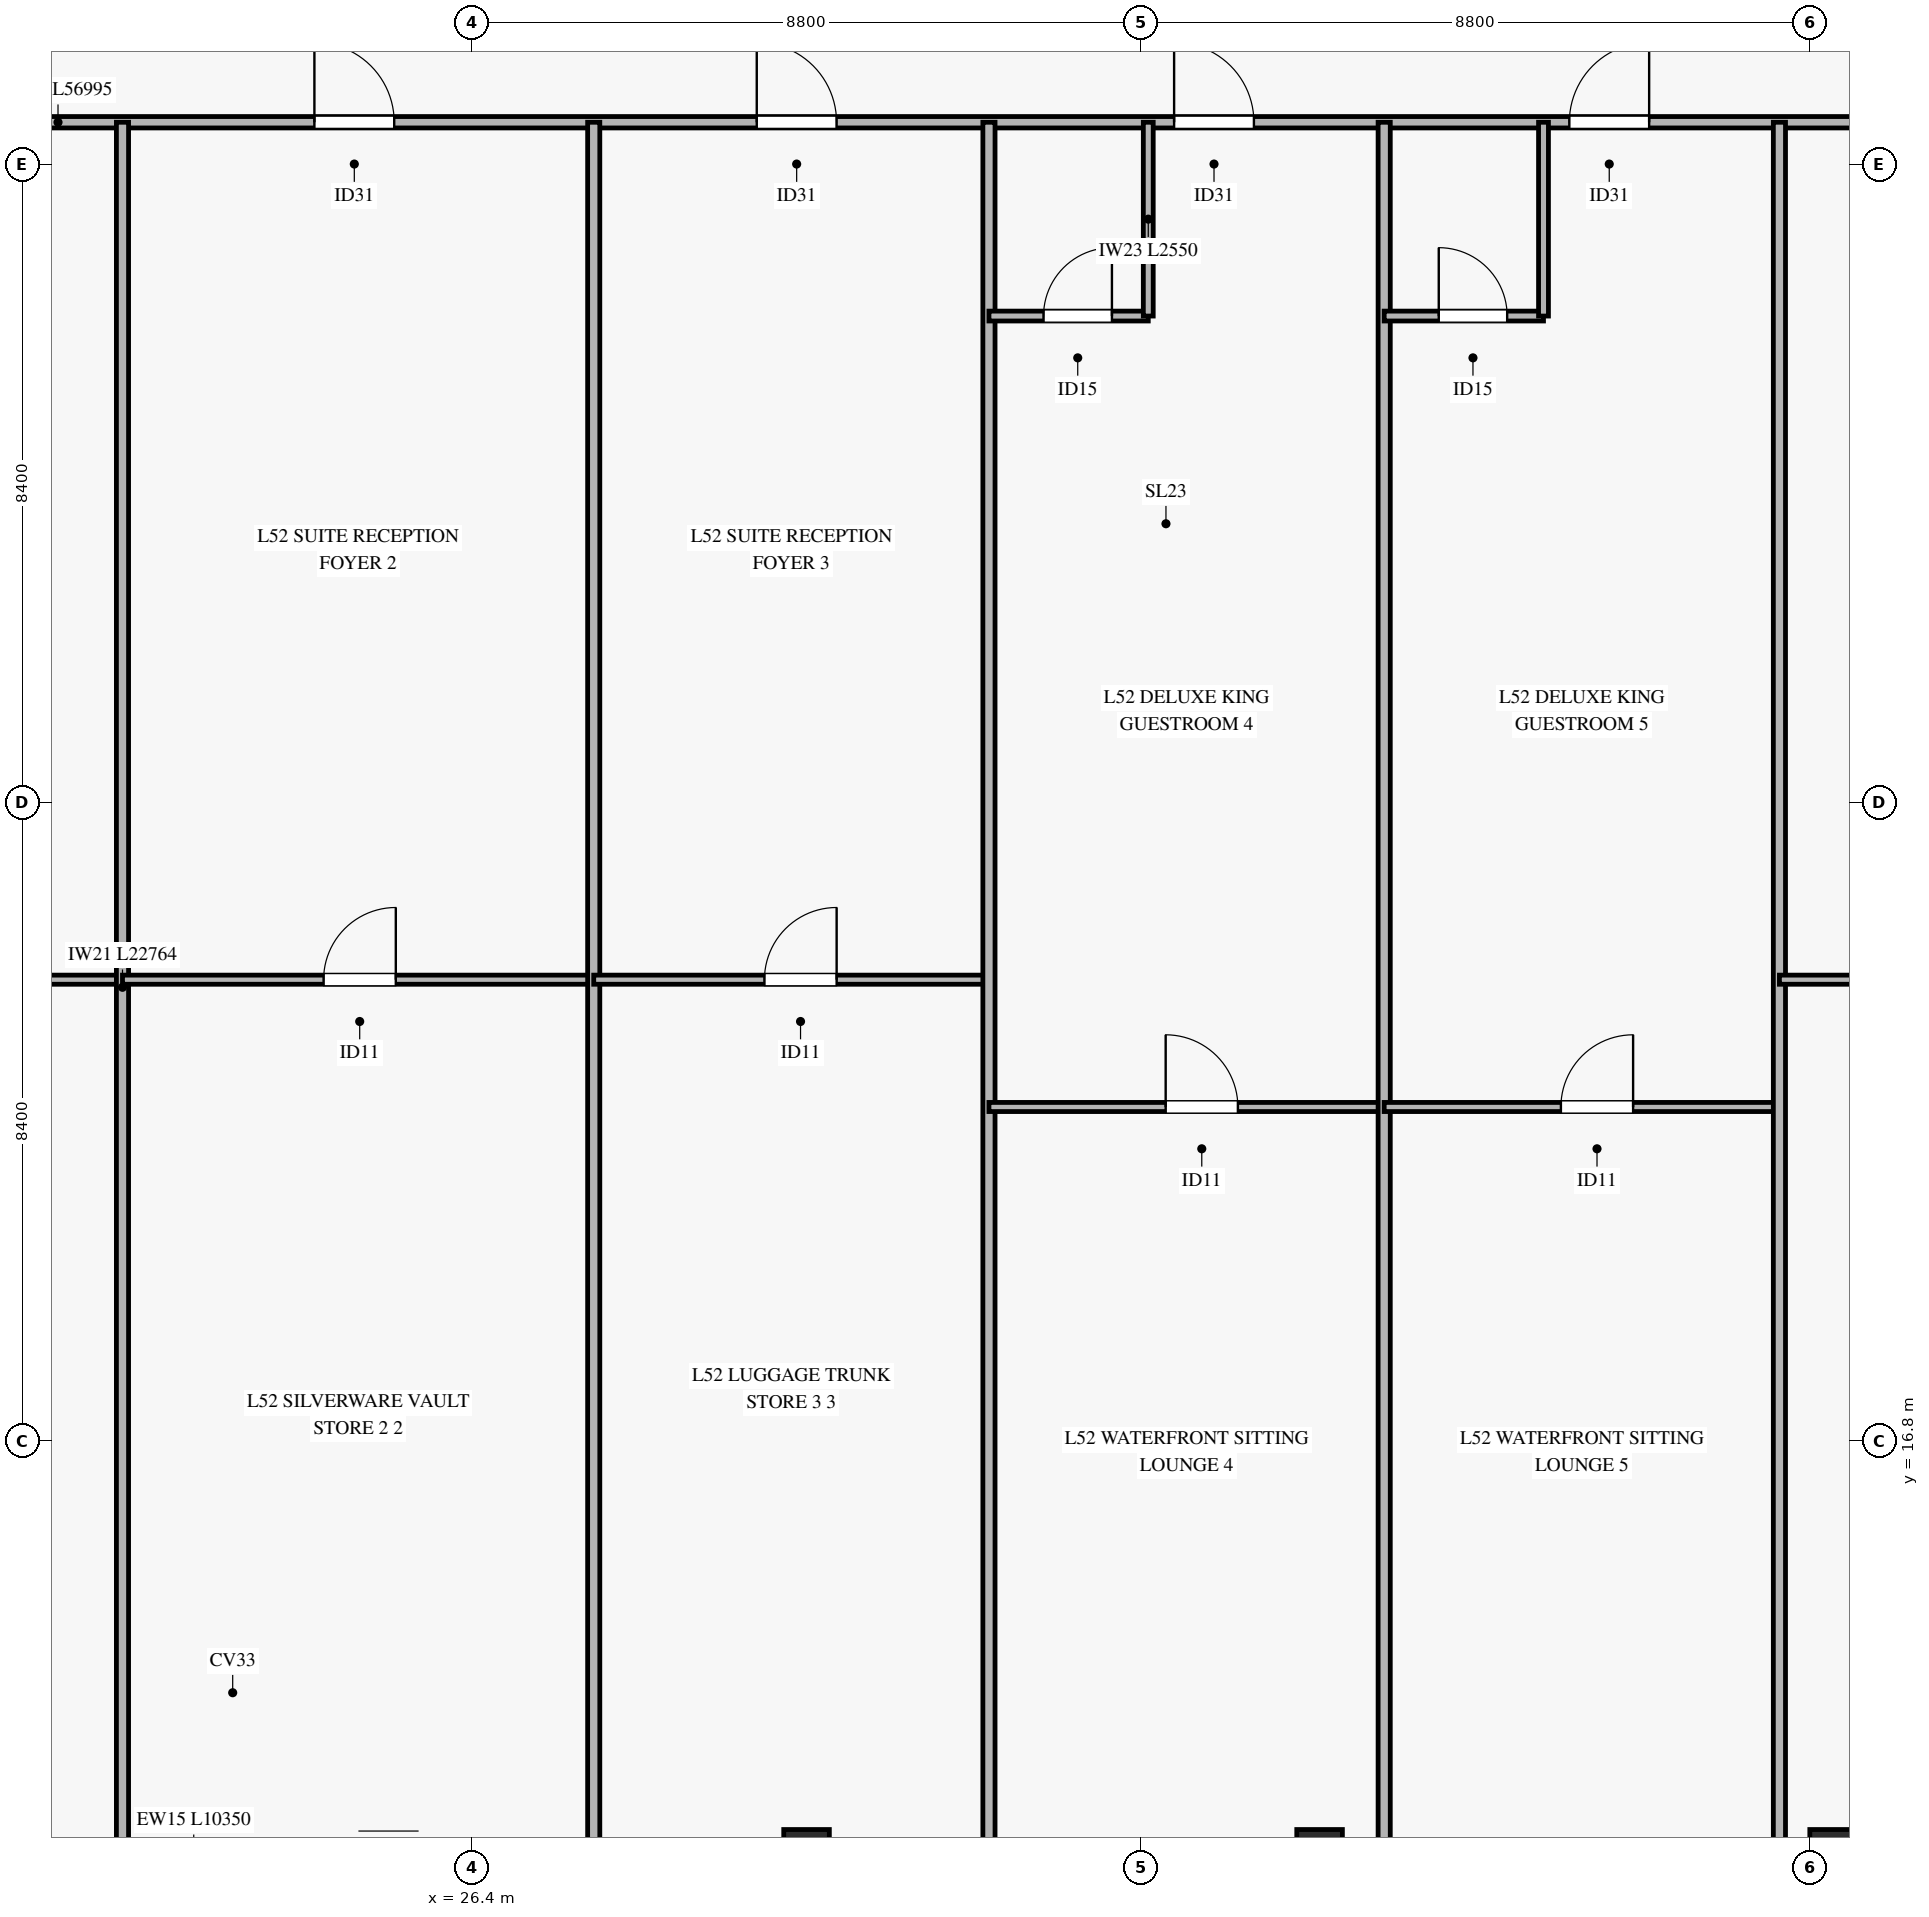
"""IFC4 building model, lengths in metres.
Left out: names, types, materials, properties, quantities, classifications, styles, units other than length and angle.
Written with IfcOpenShell. Run it as: python <this file> out.ifc"""

import sys

from ifc_helpers import new_model, si_unit, direction, frame, frame_2d, origin, origin_2d, place, context, subcontext, project, spatial, rectangle, hollow_rectangle, extrude, source, transform, mapped, element, fill, save


model = new_model("IFC4")
c1 = context("Model", 3, precision=1e-05, world=origin(), true_north=direction((0.0, 1.0)))
c2 = subcontext(c1, "Body", "Model", "MODEL_VIEW")
j1 = project(units=[si_unit("LENGTHUNIT", "METRE"), si_unit("PLANEANGLEUNIT", "RADIAN")], contexts=[c1])
p1 = place(None, origin())
s1 = spatial("IfcSite", under=j1, at=p1, CompositionType="ELEMENT")
p2 = place(p1, origin())
s2 = spatial("IfcBuilding", under=s1, at=p2, CompositionType="ELEMENT")
p3 = place(p2, frame((0.0, 0.0, 206.2)))
s3 = spatial("IfcBuildingStorey", under=s2, at=p3, CompositionType="ELEMENT", Elevation=206.2)
m1 = source(origin(), c2, "Body", "SweptSolid", [
    extrude(hollow_rectangle(XDim=0.6, YDim=0.6, WallThickness=0.028, at=origin_2d()), origin(), (0.0, 0.0, 1.0), 3.27),
])
for number, where, z_axis, x_axis in (
    (1, (30.8, 11.386, 0.0), (0.0, 0.0, 1.0), (1.0, 0.0, 0.0)),
    (2, (37.55, 11.386, 0.0), (0.0, 0.0, 1.0), (1.0, 0.0, 0.0)),
    (3, (44.3, 11.386, 0.0), (0.0, 0.0, 1.0), (1.0, 0.0, 0.0)),
):
    element("IfcColumn", number, at=place(p3, frame(where, z_axis=z_axis, x_axis=x_axis)), inside=s3, PredefinedType="COLUMN", context=c2, shape_type="MappedRepresentation", body=[
        mapped(m1, transform((0.0, 0.0, 0.0), x_axis=(1.0, 0.0, 0.0), y_axis=(0.0, 1.0, 0.0), z_axis=(0.0, 0.0, 1.0), scale=1.0)),
    ])
p4 = place(p3, frame((6.703, 34.15, 0.0), z_axis=(0.0, 0.0, 1.0), x_axis=(1.0, 0.0, 0.0)))
e4 = element("IfcWall", 4, at=p4, inside=s3, PredefinedType="PARTITIONING", context=c2, shape_type="SweptSolid", body=[
    extrude(rectangle(XDim=56.995, YDim=0.15, at=frame_2d((28.498, 0.0))), origin(), (0.0, 0.0, 1.0), 2.455),
])
p5 = place(p4, frame((6.03, 0.0, 0.0)))
e5 = element("IfcOpeningElement", 5, at=p5, cuts=e4, PredefinedType="OPENING", context=c2, shape_type="SweptSolid", body=[
    extrude(rectangle(XDim=1.05, YDim=2.15, at=frame_2d((0.525, 1.075))), frame((0.0, 0.085, 0.0), z_axis=(0.0, -1.0, 0.0), x_axis=(1.0, 0.0, 0.0)), (0.0, 0.0, 1.0), 0.17),
])
p6 = place(p4, frame((17.622, 0.0, 0.0)))
e6 = element("IfcOpeningElement", 6, at=p6, cuts=e4, PredefinedType="OPENING", context=c2, shape_type="SweptSolid", body=[
    extrude(rectangle(XDim=1.05, YDim=2.15, at=frame_2d((0.525, 1.075))), frame((0.0, 0.085, 0.0), z_axis=(0.0, -1.0, 0.0), x_axis=(1.0, 0.0, 0.0)), (0.0, 0.0, 1.0), 0.17),
])
p7 = place(p4, frame((23.442, 0.0, 0.0)))
e7 = element("IfcOpeningElement", 7, at=p7, cuts=e4, PredefinedType="OPENING", context=c2, shape_type="SweptSolid", body=[
    extrude(rectangle(XDim=1.05, YDim=2.15, at=frame_2d((0.525, 1.075))), frame((0.0, 0.085, 0.0), z_axis=(0.0, -1.0, 0.0), x_axis=(1.0, 0.0, 0.0)), (0.0, 0.0, 1.0), 0.17),
])
p8 = place(p4, frame((28.933, 0.0, 0.0)))
e8 = element("IfcOpeningElement", 8, at=p8, cuts=e4, PredefinedType="OPENING", context=c2, shape_type="SweptSolid", body=[
    extrude(rectangle(XDim=1.05, YDim=2.15, at=frame_2d((0.525, 1.075))), frame((0.0, 0.085, 0.0), z_axis=(0.0, -1.0, 0.0), x_axis=(1.0, 0.0, 0.0)), (0.0, 0.0, 1.0), 0.17),
])
p9 = place(p4, frame((34.133, 0.0, 0.0)))
e9 = element("IfcOpeningElement", 9, at=p9, cuts=e4, PredefinedType="OPENING", context=c2, shape_type="SweptSolid", body=[
    extrude(rectangle(XDim=1.05, YDim=2.15, at=frame_2d((0.525, 1.075))), frame((0.0, 0.085, 0.0), z_axis=(0.0, -1.0, 0.0), x_axis=(1.0, 0.0, 0.0)), (0.0, 0.0, 1.0), 0.17),
])
p10 = place(p4, frame((44.627, 0.0, 0.0)))
e10 = element("IfcOpeningElement", 10, at=p10, cuts=e4, PredefinedType="OPENING", context=c2, shape_type="SweptSolid", body=[
    extrude(rectangle(XDim=1.05, YDim=2.15, at=frame_2d((0.525, 1.075))), frame((0.0, 0.085, 0.0), z_axis=(0.0, -1.0, 0.0), x_axis=(1.0, 0.0, 0.0)), (0.0, 0.0, 1.0), 0.17),
])
p11 = place(p3, frame((6.703, 22.868, 0.0), z_axis=(0.0, 0.0, 1.0), x_axis=(1.0, 0.0, 0.0)))
e11 = element("IfcWall", 11, at=p11, inside=s3, PredefinedType="PARTITIONING", context=c2, shape_type="SweptSolid", body=[
    extrude(rectangle(XDim=15.097, YDim=0.12, at=frame_2d((7.549, 0.0))), origin(), (0.0, 0.0, 1.0), 2.455),
])
p12 = place(p11, frame((6.325, 0.0, 0.0)))
e12 = element("IfcOpeningElement", 12, at=p12, cuts=e11, PredefinedType="OPENING", context=c2, shape_type="SweptSolid", body=[
    extrude(rectangle(XDim=0.95, YDim=2.1, at=frame_2d((0.475, 1.05))), frame((0.0, 0.07, 0.0), z_axis=(0.0, -1.0, 0.0), x_axis=(1.0, 0.0, 0.0)), (0.0, 0.0, 1.0), 0.14),
])
p13 = place(p3, frame((21.8, 11.386, 0.0), z_axis=(0.0, 0.0, 1.0), x_axis=(0.0, 1.0, 0.0)))
e13 = element("IfcWall", 13, at=p13, inside=s3, PredefinedType="PARTITIONING", context=c2, shape_type="SweptSolid", body=[
    extrude(rectangle(XDim=22.764, YDim=0.16, at=frame_2d((11.382, 0.0))), origin(), (0.0, 0.0, 1.0), 2.755),
])
p14 = place(p3, frame((21.8, 22.868, 0.0), z_axis=(0.0, 0.0, 1.0), x_axis=(1.0, 0.0, 0.0)))
e14 = element("IfcWall", 14, at=p14, inside=s3, PredefinedType="PARTITIONING", context=c2, shape_type="SweptSolid", body=[
    extrude(rectangle(XDim=6.2, YDim=0.12, at=frame_2d((3.1, 0.0))), origin(), (0.0, 0.0, 1.0), 3.27),
])
p15 = place(p14, frame((2.646, 0.0, 0.0)))
e15 = element("IfcOpeningElement", 15, at=p15, cuts=e14, PredefinedType="OPENING", context=c2, shape_type="SweptSolid", body=[
    extrude(rectangle(XDim=0.95, YDim=2.1, at=frame_2d((0.475, 1.05))), frame((0.0, 0.07, 0.0), z_axis=(0.0, -1.0, 0.0), x_axis=(1.0, 0.0, 0.0)), (0.0, 0.0, 1.0), 0.14),
])
p16 = place(p3, frame((28.0, 11.386, 0.0), z_axis=(0.0, 0.0, 1.0), x_axis=(0.0, 1.0, 0.0)))
e16 = element("IfcWall", 16, at=p16, inside=s3, PredefinedType="PARTITIONING", context=c2, shape_type="SweptSolid", body=[
    extrude(rectangle(XDim=22.764, YDim=0.16, at=frame_2d((11.382, 0.0))), origin(), (0.0, 0.0, 1.0), 2.755),
])
p17 = place(p3, frame((28.0, 22.868, 0.0), z_axis=(0.0, 0.0, 1.0), x_axis=(1.0, 0.0, 0.0)))
e17 = element("IfcWall", 17, at=p17, inside=s3, PredefinedType="PARTITIONING", context=c2, shape_type="SweptSolid", body=[
    extrude(rectangle(XDim=5.2, YDim=0.12, at=frame_2d((2.6, 0.0))), origin(), (0.0, 0.0, 1.0), 2.455),
])
p18 = place(p17, frame((2.246, 0.0, 0.0)))
e18 = element("IfcOpeningElement", 18, at=p18, cuts=e17, PredefinedType="OPENING", context=c2, shape_type="SweptSolid", body=[
    extrude(rectangle(XDim=0.95, YDim=2.1, at=frame_2d((0.475, 1.05))), frame((0.0, 0.07, 0.0), z_axis=(0.0, -1.0, 0.0), x_axis=(1.0, 0.0, 0.0)), (0.0, 0.0, 1.0), 0.14),
])
p19 = place(p3, frame((33.2, 11.386, 0.0), z_axis=(0.0, 0.0, 1.0), x_axis=(0.0, 1.0, 0.0)))
e19 = element("IfcWall", 19, at=p19, inside=s3, PredefinedType="PARTITIONING", context=c2, shape_type="SweptSolid", body=[
    extrude(rectangle(XDim=22.764, YDim=0.16, at=frame_2d((11.382, 0.0))), origin(), (0.0, 0.0, 1.0), 2.755),
])
p20 = place(p3, frame((33.2, 31.6, 0.0), z_axis=(0.0, 0.0, 1.0), x_axis=(1.0, 0.0, 0.0)))
e20 = element("IfcWall", 20, at=p20, inside=s3, PredefinedType="PARTITIONING", context=c2, shape_type="SweptSolid", body=[
    extrude(rectangle(XDim=2.096, YDim=0.13, at=frame_2d((1.048, 0.0))), origin(), (0.0, 0.0, 1.0), 3.27),
])
p21 = place(p20, frame((0.718, 0.0, 0.0)))
e21 = element("IfcOpeningElement", 21, at=p21, cuts=e20, PredefinedType="OPENING", context=c2, shape_type="SweptSolid", body=[
    extrude(rectangle(XDim=0.9, YDim=2.1, at=frame_2d((0.45, 1.05))), frame((0.0, 0.075, 0.0), z_axis=(0.0, -1.0, 0.0), x_axis=(1.0, 0.0, 0.0)), (0.0, 0.0, 1.0), 0.15),
])
p22 = place(p3, frame((35.296, 31.6, 0.0), z_axis=(0.0, 0.0, 1.0), x_axis=(0.0, 1.0, 0.0)))
e22 = element("IfcWall", 22, at=p22, inside=s3, PredefinedType="PARTITIONING", context=c2, shape_type="SweptSolid", body=[
    extrude(rectangle(XDim=2.55, YDim=0.13, at=frame_2d((1.275, 0.0))), origin(), (0.0, 0.0, 1.0), 2.855),
])
p23 = place(p3, frame((33.2, 21.193, 0.0), z_axis=(0.0, 0.0, 1.0), x_axis=(1.0, 0.0, 0.0)))
e23 = element("IfcWall", 23, at=p23, inside=s3, PredefinedType="PARTITIONING", context=c2, shape_type="SweptSolid", body=[
    extrude(rectangle(XDim=5.2, YDim=0.12, at=frame_2d((2.6, 0.0))), origin(), (0.0, 0.0, 1.0), 2.455),
])
p24 = place(p23, frame((2.325, 0.0, 0.0)))
e24 = element("IfcOpeningElement", 24, at=p24, cuts=e23, PredefinedType="OPENING", context=c2, shape_type="SweptSolid", body=[
    extrude(rectangle(XDim=0.95, YDim=2.1, at=frame_2d((0.475, 1.05))), frame((0.0, 0.07, 0.0), z_axis=(0.0, -1.0, 0.0), x_axis=(1.0, 0.0, 0.0)), (0.0, 0.0, 1.0), 0.14),
])
p25 = place(p3, frame((38.4, 11.386, 0.0), z_axis=(0.0, 0.0, 1.0), x_axis=(0.0, 1.0, 0.0)))
e25 = element("IfcWall", 25, at=p25, inside=s3, PredefinedType="PARTITIONING", context=c2, shape_type="SweptSolid", body=[
    extrude(rectangle(XDim=22.764, YDim=0.16, at=frame_2d((11.382, 0.0))), origin(), (0.0, 0.0, 1.0), 2.755),
])
p26 = place(p3, frame((38.4, 31.6, 0.0), z_axis=(0.0, 0.0, 1.0), x_axis=(1.0, 0.0, 0.0)))
e26 = element("IfcWall", 26, at=p26, inside=s3, PredefinedType="PARTITIONING", context=c2, shape_type="SweptSolid", body=[
    extrude(rectangle(XDim=2.096, YDim=0.13, at=frame_2d((1.048, 0.0))), origin(), (0.0, 0.0, 1.0), 3.27),
])
p27 = place(p26, frame((0.718, 0.0, 0.0)))
e27 = element("IfcOpeningElement", 27, at=p27, cuts=e26, PredefinedType="OPENING", context=c2, shape_type="SweptSolid", body=[
    extrude(rectangle(XDim=0.9, YDim=2.1, at=frame_2d((0.45, 1.05))), frame((0.0, 0.075, 0.0), z_axis=(0.0, -1.0, 0.0), x_axis=(1.0, 0.0, 0.0)), (0.0, 0.0, 1.0), 0.15),
])
p28 = place(p3, frame((40.496, 31.6, 0.0), z_axis=(0.0, 0.0, 1.0), x_axis=(0.0, 1.0, 0.0)))
e28 = element("IfcWall", 28, at=p28, inside=s3, PredefinedType="PARTITIONING", context=c2, shape_type="SweptSolid", body=[
    extrude(rectangle(XDim=2.55, YDim=0.13, at=frame_2d((1.275, 0.0))), origin(), (0.0, 0.0, 1.0), 2.855),
])
p29 = place(p3, frame((38.4, 21.193, 0.0), z_axis=(0.0, 0.0, 1.0), x_axis=(1.0, 0.0, 0.0)))
e29 = element("IfcWall", 29, at=p29, inside=s3, PredefinedType="PARTITIONING", context=c2, shape_type="SweptSolid", body=[
    extrude(rectangle(XDim=5.2, YDim=0.12, at=frame_2d((2.6, 0.0))), origin(), (0.0, 0.0, 1.0), 3.27),
])
p30 = place(p29, frame((2.325, 0.0, 0.0)))
e30 = element("IfcOpeningElement", 30, at=p30, cuts=e29, PredefinedType="OPENING", context=c2, shape_type="SweptSolid", body=[
    extrude(rectangle(XDim=0.95, YDim=2.1, at=frame_2d((0.475, 1.05))), frame((0.0, 0.07, 0.0), z_axis=(0.0, -1.0, 0.0), x_axis=(1.0, 0.0, 0.0)), (0.0, 0.0, 1.0), 0.14),
])
p31 = place(p3, frame((43.6, 11.386, 0.0), z_axis=(0.0, 0.0, 1.0), x_axis=(0.0, 1.0, 0.0)))
e31 = element("IfcWall", 31, at=p31, inside=s3, PredefinedType="PARTITIONING", context=c2, shape_type="SweptSolid", body=[
    extrude(rectangle(XDim=22.764, YDim=0.16, at=frame_2d((11.382, 0.0))), origin(), (0.0, 0.0, 1.0), 2.755),
])
p32 = place(p3, frame((43.6, 22.868, 0.0), z_axis=(0.0, 0.0, 1.0), x_axis=(1.0, 0.0, 0.0)))
e32 = element("IfcWall", 32, at=p32, inside=s3, PredefinedType="PARTITIONING", context=c2, shape_type="SweptSolid", body=[
    extrude(rectangle(XDim=20.098, YDim=0.12, at=frame_2d((10.049, 0.0))), origin(), (0.0, 0.0, 1.0), 2.455),
])
p33 = place(p32, frame((8.125, 0.0, 0.0)))
e33 = element("IfcOpeningElement", 33, at=p33, cuts=e32, PredefinedType="OPENING", context=c2, shape_type="SweptSolid", body=[
    extrude(rectangle(XDim=0.95, YDim=2.1, at=frame_2d((0.475, 1.05))), frame((0.0, 0.07, 0.0), z_axis=(0.0, -1.0, 0.0), x_axis=(1.0, 0.0, 0.0)), (0.0, 0.0, 1.0), 0.14),
])
m2 = source(origin(), c2, "Body", "SweptSolid", [
    extrude(rectangle(XDim=1.05, YDim=2.15, at=frame_2d((0.525, 1.075))), frame((0.0, 0.025, 0.0), z_axis=(0.0, -1.0, 0.0), x_axis=(1.0, 0.0, 0.0)), (0.0, 0.0, 1.0), 0.05),
])
p34 = place(p6, origin())
e34 = element("IfcDoor", 34, at=p34, inside=s3, OperationType="SINGLE_SWING_LEFT", PredefinedType="DOOR", context=c2, shape_type="MappedRepresentation", body=[
    mapped(m2, transform((0.0, 0.0, 0.0), x_axis=(1.0, 0.0, 0.0), y_axis=(0.0, 1.0, 0.0), z_axis=(0.0, 0.0, 1.0), scale=1.0)),
])
fill(e6, e34)
m3 = source(origin(), c2, "Body", "SweptSolid", [
    extrude(rectangle(XDim=0.95, YDim=2.1, at=frame_2d((0.475, 1.05))), frame((0.0, 0.025, 0.0), z_axis=(0.0, -1.0, 0.0), x_axis=(1.0, 0.0, 0.0)), (0.0, 0.0, 1.0), 0.05),
])
p35 = place(p15, origin())
e35 = element("IfcDoor", 35, at=p35, inside=s3, OperationType="SINGLE_SWING_RIGHT", PredefinedType="DOOR", context=c2, shape_type="MappedRepresentation", body=[
    mapped(m3, transform((0.0, 0.0, 0.0), x_axis=(1.0, 0.0, 0.0), y_axis=(0.0, 1.0, 0.0), z_axis=(0.0, 0.0, 1.0), scale=1.0)),
])
fill(e15, e35)
p36 = place(p7, origin())
e36 = element("IfcDoor", 36, at=p36, inside=s3, OperationType="SINGLE_SWING_LEFT", PredefinedType="DOOR", context=c2, shape_type="MappedRepresentation", body=[
    mapped(m2, transform((0.0, 0.0, 0.0), x_axis=(1.0, 0.0, 0.0), y_axis=(0.0, 1.0, 0.0), z_axis=(0.0, 0.0, 1.0), scale=1.0)),
])
fill(e7, e36)
p37 = place(p18, origin())
e37 = element("IfcDoor", 37, at=p37, inside=s3, OperationType="SINGLE_SWING_RIGHT", PredefinedType="DOOR", context=c2, shape_type="MappedRepresentation", body=[
    mapped(m3, transform((0.0, 0.0, 0.0), x_axis=(1.0, 0.0, 0.0), y_axis=(0.0, 1.0, 0.0), z_axis=(0.0, 0.0, 1.0), scale=1.0)),
])
fill(e18, e37)
p38 = place(p8, origin())
e38 = element("IfcDoor", 38, at=p38, inside=s3, OperationType="SINGLE_SWING_LEFT", PredefinedType="DOOR", context=c2, shape_type="MappedRepresentation", body=[
    mapped(m2, transform((0.0, 0.0, 0.0), x_axis=(1.0, 0.0, 0.0), y_axis=(0.0, 1.0, 0.0), z_axis=(0.0, 0.0, 1.0), scale=1.0)),
])
fill(e8, e38)
m4 = source(origin(), c2, "Body", "SweptSolid", [
    extrude(rectangle(XDim=0.9, YDim=2.1, at=frame_2d((0.45, 1.05))), frame((0.0, 0.025, 0.0), z_axis=(0.0, -1.0, 0.0), x_axis=(1.0, 0.0, 0.0)), (0.0, 0.0, 1.0), 0.05),
])
p39 = place(p21, origin())
e39 = element("IfcDoor", 39, at=p39, inside=s3, OperationType="SINGLE_SWING_RIGHT", PredefinedType="DOOR", context=c2, shape_type="MappedRepresentation", body=[
    mapped(m4, transform((0.0, 0.0, 0.0), x_axis=(1.0, 0.0, 0.0), y_axis=(0.0, 1.0, 0.0), z_axis=(0.0, 0.0, 1.0), scale=1.0)),
])
fill(e21, e39)
p40 = place(p24, origin())
e40 = element("IfcDoor", 40, at=p40, inside=s3, OperationType="SINGLE_SWING_LEFT", PredefinedType="DOOR", context=c2, shape_type="MappedRepresentation", body=[
    mapped(m3, transform((0.0, 0.0, 0.0), x_axis=(1.0, 0.0, 0.0), y_axis=(0.0, 1.0, 0.0), z_axis=(0.0, 0.0, 1.0), scale=1.0)),
])
fill(e24, e40)
p41 = place(p9, origin())
e41 = element("IfcDoor", 41, at=p41, inside=s3, OperationType="SINGLE_SWING_RIGHT", PredefinedType="DOOR", context=c2, shape_type="MappedRepresentation", body=[
    mapped(m2, transform((0.0, 0.0, 0.0), x_axis=(1.0, 0.0, 0.0), y_axis=(0.0, 1.0, 0.0), z_axis=(0.0, 0.0, 1.0), scale=1.0)),
])
fill(e9, e41)
p42 = place(p27, origin())
e42 = element("IfcDoor", 42, at=p42, inside=s3, OperationType="SINGLE_SWING_LEFT", PredefinedType="DOOR", context=c2, shape_type="MappedRepresentation", body=[
    mapped(m4, transform((0.0, 0.0, 0.0), x_axis=(1.0, 0.0, 0.0), y_axis=(0.0, 1.0, 0.0), z_axis=(0.0, 0.0, 1.0), scale=1.0)),
])
fill(e27, e42)
p43 = place(p30, origin())
e43 = element("IfcDoor", 43, at=p43, inside=s3, OperationType="SINGLE_SWING_RIGHT", PredefinedType="DOOR", context=c2, shape_type="MappedRepresentation", body=[
    mapped(m3, transform((0.0, 0.0, 0.0), x_axis=(1.0, 0.0, 0.0), y_axis=(0.0, 1.0, 0.0), z_axis=(0.0, 0.0, 1.0), scale=1.0)),
])
fill(e30, e43)
save(model, sys.argv[1])
